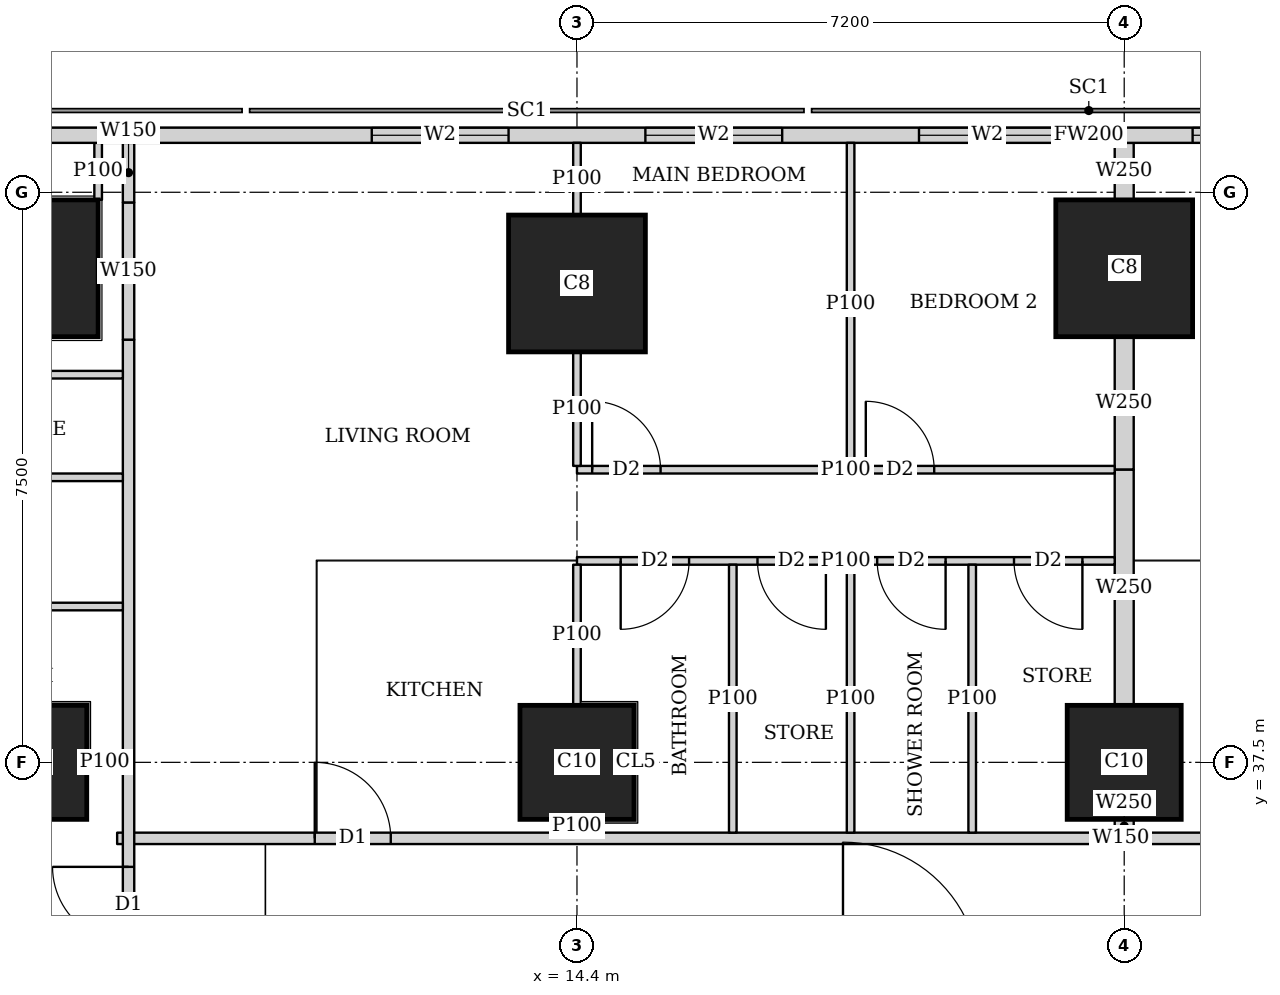
"""IFC4 building model, lengths in metres.
Left out: names, types, materials, properties, quantities, classifications, styles, units other than length and angle.
Written with IfcOpenShell. Run it as: python <this file> out.ifc"""

import sys

from ifc_helpers import new_model, si_unit, direction, frame, frame_2d, origin, origin_2d, place, context, subcontext, project, spatial, rectangle, extrude, element, fill, save


model = new_model("IFC4")
c1 = context("Model", 3, precision=1e-05, world=origin(), true_north=direction((0.0, 1.0)))
c2 = subcontext(c1, "Body", "Model", "MODEL_VIEW")
j1 = project(units=[si_unit("LENGTHUNIT", "METRE"), si_unit("PLANEANGLEUNIT", "RADIAN")], contexts=[c1])
p1 = place(None, origin())
s1 = spatial("IfcSite", under=j1, at=p1, CompositionType="ELEMENT")
p2 = place(p1, origin())
s2 = spatial("IfcBuilding", under=s1, at=p2, CompositionType="ELEMENT")
p3 = place(p2, frame((0.0, 0.0, 180.8)))
s3 = spatial("IfcBuildingStorey", under=s2, at=p3, CompositionType="ELEMENT", Elevation=180.8)
for number, where, z_axis, x_axis in (
    (1, (7.2, 37.5, 0.0), (0.0, 0.0, 1.0), (1.0, 0.0, 0.0)),
    (2, (14.4, 37.5, 0.0), (0.0, 0.0, 1.0), (1.0, 0.0, 0.0)),
    (3, (21.6, 37.5, 0.0), (0.0, 0.0, 1.0), (1.0, 0.0, 0.0)),
):
    element("IfcColumn", number, at=place(p3, frame(where, z_axis=z_axis, x_axis=x_axis)), inside=s3, PredefinedType="COLUMN", context=c2, shape_type="SweptSolid", body=[
        extrude(rectangle(XDim=1.5, YDim=1.5, at=origin_2d()), origin(), (0.0, 0.0, 1.0), 3.75),
    ])
for number, where, z_axis, x_axis in (
    (4, (7.2, 44.0, 0.0), (0.0, 0.0, 1.0), (1.0, 0.0, 0.0)),
    (5, (14.4, 43.8, 0.0), (0.0, 0.0, 1.0), (1.0, 0.0, 0.0)),
    (6, (21.6, 44.0, 0.0), (0.0, 0.0, 1.0), (1.0, 0.0, 0.0)),
):
    element("IfcColumn", number, at=place(p3, frame(where, z_axis=z_axis, x_axis=x_axis)), inside=s3, PredefinedType="COLUMN", context=c2, shape_type="SweptSolid", body=[
        extrude(rectangle(XDim=1.8, YDim=1.8, at=origin_2d()), origin(), (0.0, 0.0, 1.0), 3.75),
    ])
p4 = place(p3, frame((40.106, 45.75, 0.0), z_axis=(0.0, 0.0, 1.0), x_axis=(-1.0, 0.0, 0.0)))
e7 = element("IfcWall", 7, at=p4, inside=s3, PredefinedType="SOLIDWALL", context=c2, shape_type="SweptSolid", body=[
    extrude(rectangle(XDim=37.943, YDim=0.2, at=frame_2d((18.971, 0.0))), origin(), (0.0, 0.0, 1.0), 3.5),
])
p5 = place(p4, frame((8.606, 0.0, 0.9)))
e8 = element("IfcOpeningElement", 8, at=p5, cuts=e7, PredefinedType="OPENING", context=c2, shape_type="SweptSolid", body=[
    extrude(rectangle(XDim=1.8, YDim=1.5, at=frame_2d((0.9, 0.75))), frame((0.0, 0.11, 0.0), z_axis=(0.0, -1.0, 0.0), x_axis=(1.0, 0.0, 0.0)), (0.0, 0.0, 1.0), 0.22),
])
p6 = place(p4, frame((12.206, 0.0, 0.9)))
e9 = element("IfcOpeningElement", 9, at=p6, cuts=e7, PredefinedType="OPENING", context=c2, shape_type="SweptSolid", body=[
    extrude(rectangle(XDim=1.8, YDim=1.5, at=frame_2d((0.9, 0.75))), frame((0.0, 0.11, 0.0), z_axis=(0.0, -1.0, 0.0), x_axis=(1.0, 0.0, 0.0)), (0.0, 0.0, 1.0), 0.22),
])
p7 = place(p4, frame((15.806, 0.0, 0.9)))
e10 = element("IfcOpeningElement", 10, at=p7, cuts=e7, PredefinedType="OPENING", context=c2, shape_type="SweptSolid", body=[
    extrude(rectangle(XDim=1.8, YDim=1.5, at=frame_2d((0.9, 0.75))), frame((0.0, 0.11, 0.0), z_axis=(0.0, -1.0, 0.0), x_axis=(1.0, 0.0, 0.0)), (0.0, 0.0, 1.0), 0.22),
])
p8 = place(p4, frame((19.406, 0.0, 0.9)))
e11 = element("IfcOpeningElement", 11, at=p8, cuts=e7, PredefinedType="OPENING", context=c2, shape_type="SweptSolid", body=[
    extrude(rectangle(XDim=1.8, YDim=1.5, at=frame_2d((0.9, 0.75))), frame((0.0, 0.11, 0.0), z_axis=(0.0, -1.0, 0.0), x_axis=(1.0, 0.0, 0.0)), (0.0, 0.0, 1.0), 0.22),
])
p9 = place(p4, frame((23.006, 0.0, 0.9)))
e12 = element("IfcOpeningElement", 12, at=p9, cuts=e7, PredefinedType="OPENING", context=c2, shape_type="SweptSolid", body=[
    extrude(rectangle(XDim=1.8, YDim=1.5, at=frame_2d((0.9, 0.75))), frame((0.0, 0.11, 0.0), z_axis=(0.0, -1.0, 0.0), x_axis=(1.0, 0.0, 0.0)), (0.0, 0.0, 1.0), 0.22),
])
p10 = place(p4, frame((26.606, 0.0, 0.9)))
e13 = element("IfcOpeningElement", 13, at=p10, cuts=e7, PredefinedType="OPENING", context=c2, shape_type="SweptSolid", body=[
    extrude(rectangle(XDim=1.8, YDim=1.5, at=frame_2d((0.9, 0.75))), frame((0.0, 0.11, 0.0), z_axis=(0.0, -1.0, 0.0), x_axis=(1.0, 0.0, 0.0)), (0.0, 0.0, 1.0), 0.22),
])
p11 = place(p3, frame((8.5, 1.964, 0.0), z_axis=(0.0, 0.0, 1.0), x_axis=(0.0, 1.0, 0.0)))
e14 = element("IfcWall", 14, at=p11, inside=s3, PredefinedType="SOLIDWALL", context=c2, shape_type="SweptSolid", body=[
    extrude(rectangle(XDim=41.097, YDim=0.15, at=frame_2d((20.548, 0.0))), origin(), (0.0, 0.0, 1.0), 3.5),
])
p12 = place(p11, frame((10.661, 0.0, 0.0)))
e15 = element("IfcOpeningElement", 15, at=p12, cuts=e14, PredefinedType="OPENING", context=c2, shape_type="SweptSolid", body=[
    extrude(rectangle(XDim=1.0, YDim=2.1, at=frame_2d((0.5, 1.05))), frame((0.0, 0.085, 0.0), z_axis=(0.0, -1.0, 0.0), x_axis=(1.0, 0.0, 0.0)), (0.0, 0.0, 1.0), 0.17),
])
p13 = place(p11, frame((14.411, 0.0, 0.0)))
e16 = element("IfcOpeningElement", 16, at=p13, cuts=e14, PredefinedType="OPENING", context=c2, shape_type="SweptSolid", body=[
    extrude(rectangle(XDim=1.0, YDim=2.1, at=frame_2d((0.5, 1.05))), frame((0.0, 0.085, 0.0), z_axis=(0.0, -1.0, 0.0), x_axis=(1.0, 0.0, 0.0)), (0.0, 0.0, 1.0), 0.17),
])
p14 = place(p11, frame((21.911, 0.0, 0.0)))
e17 = element("IfcOpeningElement", 17, at=p14, cuts=e14, PredefinedType="OPENING", context=c2, shape_type="SweptSolid", body=[
    extrude(rectangle(XDim=1.0, YDim=2.1, at=frame_2d((0.5, 1.05))), frame((0.0, 0.085, 0.0), z_axis=(0.0, -1.0, 0.0), x_axis=(1.0, 0.0, 0.0)), (0.0, 0.0, 1.0), 0.17),
])
p15 = place(p11, frame((33.161, 0.0, 0.0)))
e18 = element("IfcOpeningElement", 18, at=p15, cuts=e14, PredefinedType="OPENING", context=c2, shape_type="SweptSolid", body=[
    extrude(rectangle(XDim=1.0, YDim=2.1, at=frame_2d((0.5, 1.05))), frame((0.0, 0.085, 0.0), z_axis=(0.0, -1.0, 0.0), x_axis=(1.0, 0.0, 0.0)), (0.0, 0.0, 1.0), 0.17),
])
p16 = place(p3, frame((8.5, 43.061, 0.0), z_axis=(0.0, 0.0, 1.0), x_axis=(0.0, 1.0, 0.0)))
e19 = element("IfcWall", 19, at=p16, inside=s3, PredefinedType="SOLIDWALL", context=c2, shape_type="SweptSolid", body=[
    extrude(rectangle(XDim=1.805, YDim=0.15, at=frame_2d((0.902, 0.0))), origin(), (0.0, 0.0, 1.0), 2.1),
])
p17 = place(p3, frame((8.5, 44.866, 0.0), z_axis=(0.0, 0.0, 1.0), x_axis=(0.0, 1.0, 0.0)))
e20 = element("IfcWall", 20, at=p17, inside=s3, PredefinedType="SOLIDWALL", context=c2, shape_type="SweptSolid", body=[
    extrude(rectangle(XDim=0.784, YDim=0.15, at=frame_2d((0.392, 0.0))), origin(), (0.0, 0.0, 1.0), 3.5),
])
p18 = place(p3, frame((8.35, 36.5, 0.0), z_axis=(0.0, 0.0, 1.0), x_axis=(1.0, 0.0, 0.0)))
e21 = element("IfcWall", 21, at=p18, inside=s3, PredefinedType="SOLIDWALL", context=c2, shape_type="SweptSolid", body=[
    extrude(rectangle(XDim=26.415, YDim=0.15, at=frame_2d((13.208, 0.0))), origin(), (0.0, 0.0, 1.0), 3.5),
])
p19 = place(p18, frame((2.6, 0.0, 0.0)))
e22 = element("IfcOpeningElement", 22, at=p19, cuts=e21, PredefinedType="OPENING", context=c2, shape_type="SweptSolid", body=[
    extrude(rectangle(XDim=1.0, YDim=2.1, at=frame_2d((0.5, 1.05))), frame((0.0, 0.085, 0.0), z_axis=(0.0, -1.0, 0.0), x_axis=(1.0, 0.0, 0.0)), (0.0, 0.0, 1.0), 0.17),
])
p20 = place(p18, frame((14.75, 0.0, 0.0)))
e23 = element("IfcOpeningElement", 23, at=p20, cuts=e21, PredefinedType="OPENING", context=c2, shape_type="SweptSolid", body=[
    extrude(rectangle(XDim=1.0, YDim=2.1, at=frame_2d((0.5, 1.05))), frame((0.0, 0.085, 0.0), z_axis=(0.0, -1.0, 0.0), x_axis=(1.0, 0.0, 0.0)), (0.0, 0.0, 1.0), 0.17),
])
p21 = place(p18, frame((23.923, 0.0, 0.0)))
e24 = element("IfcOpeningElement", 24, at=p21, cuts=e21, PredefinedType="OPENING", context=c2, shape_type="SweptSolid", body=[
    extrude(rectangle(XDim=1.0, YDim=2.1, at=frame_2d((0.5, 1.05))), frame((0.0, 0.085, 0.0), z_axis=(0.0, -1.0, 0.0), x_axis=(1.0, 0.0, 0.0)), (0.0, 0.0, 1.0), 0.17),
])
p22 = place(p3, frame((8.1, 45.65, 0.0), z_axis=(0.0, 0.0, 1.0), x_axis=(0.0, -1.0, 0.0)))
e25 = element("IfcWall", 25, at=p22, inside=s3, PredefinedType="PARTITIONING", context=c2, shape_type="SweptSolid", body=[
    extrude(rectangle(XDim=0.749, YDim=0.1, at=frame_2d((0.375, 0.0))), origin(), (0.0, 0.0, 1.0), 3.5),
])
p23 = place(p3, frame((7.951, 37.5, 0.0), z_axis=(0.0, 0.0, 1.0), x_axis=(1.0, 0.0, 0.0)))
e26 = element("IfcWall", 26, at=p23, inside=s3, PredefinedType="PARTITIONING", context=c2, shape_type="SweptSolid", body=[
    extrude(rectangle(XDim=0.474, YDim=0.1, at=frame_2d((0.237, 0.0))), origin(), (0.0, 0.0, 1.0), 3.5),
])
for number, where, z_axis, x_axis in (
    (27, (4.9, 41.25, 0.0), (0.0, 0.0, 1.0), (1.0, 0.0, 0.0)),
    (28, (4.9, 39.55, 0.0), (0.0, 0.0, 1.0), (1.0, 0.0, 0.0)),
):
    element("IfcWall", number, at=place(p3, frame(where, z_axis=z_axis, x_axis=x_axis)), inside=s3, PredefinedType="PARTITIONING", context=c2, shape_type="SweptSolid", body=[
        extrude(rectangle(XDim=3.525, YDim=0.1, at=frame_2d((1.763, 0.0))), origin(), (0.0, 0.0, 1.0), 3.5),
    ])
p24 = place(p3, frame((14.4, 41.35, 0.0), z_axis=(0.0, 0.0, 1.0), x_axis=(1.0, 0.0, 0.0)))
e29 = element("IfcWall", 29, at=p24, inside=s3, PredefinedType="PARTITIONING", context=c2, shape_type="SweptSolid", body=[
    extrude(rectangle(XDim=7.075, YDim=0.1, at=frame_2d((3.538, 0.0))), origin(), (0.0, 0.0, 1.0), 3.5),
])
p25 = place(p24, frame((0.2, 0.0, 0.0)))
e30 = element("IfcOpeningElement", 30, at=p25, cuts=e29, PredefinedType="OPENING", context=c2, shape_type="SweptSolid", body=[
    extrude(rectangle(XDim=0.9, YDim=2.1, at=frame_2d((0.45, 1.05))), frame((0.0, 0.06, 0.0), z_axis=(0.0, -1.0, 0.0), x_axis=(1.0, 0.0, 0.0)), (0.0, 0.0, 1.0), 0.12),
])
p26 = place(p24, frame((3.8, 0.0, 0.0)))
e31 = element("IfcOpeningElement", 31, at=p26, cuts=e29, PredefinedType="OPENING", context=c2, shape_type="SweptSolid", body=[
    extrude(rectangle(XDim=0.9, YDim=2.1, at=frame_2d((0.45, 1.05))), frame((0.0, 0.06, 0.0), z_axis=(0.0, -1.0, 0.0), x_axis=(1.0, 0.0, 0.0)), (0.0, 0.0, 1.0), 0.12),
])
p27 = place(p3, frame((14.4, 40.15, 0.0), z_axis=(0.0, 0.0, 1.0), x_axis=(1.0, 0.0, 0.0)))
e32 = element("IfcWall", 32, at=p27, inside=s3, PredefinedType="PARTITIONING", context=c2, shape_type="SweptSolid", body=[
    extrude(rectangle(XDim=7.075, YDim=0.1, at=frame_2d((3.538, 0.0))), origin(), (0.0, 0.0, 1.0), 3.5),
])
p28 = place(p27, frame((0.575, 0.0, 0.0)))
e33 = element("IfcOpeningElement", 33, at=p28, cuts=e32, PredefinedType="OPENING", context=c2, shape_type="SweptSolid", body=[
    extrude(rectangle(XDim=0.9, YDim=2.1, at=frame_2d((0.45, 1.05))), frame((0.0, 0.06, 0.0), z_axis=(0.0, -1.0, 0.0), x_axis=(1.0, 0.0, 0.0)), (0.0, 0.0, 1.0), 0.12),
])
p29 = place(p27, frame((3.95, 0.0, 0.0)))
e34 = element("IfcOpeningElement", 34, at=p29, cuts=e32, PredefinedType="OPENING", context=c2, shape_type="SweptSolid", body=[
    extrude(rectangle(XDim=0.9, YDim=2.1, at=frame_2d((0.45, 1.05))), frame((0.0, 0.06, 0.0), z_axis=(0.0, -1.0, 0.0), x_axis=(1.0, 0.0, 0.0)), (0.0, 0.0, 1.0), 0.12),
])
p30 = place(p27, frame((2.375, 0.0, 0.0)))
e35 = element("IfcOpeningElement", 35, at=p30, cuts=e32, PredefinedType="OPENING", context=c2, shape_type="SweptSolid", body=[
    extrude(rectangle(XDim=0.9, YDim=2.1, at=frame_2d((0.45, 1.05))), frame((0.0, 0.06, 0.0), z_axis=(0.0, -1.0, 0.0), x_axis=(1.0, 0.0, 0.0)), (0.0, 0.0, 1.0), 0.12),
])
p31 = place(p27, frame((5.75, 0.0, 0.0)))
e36 = element("IfcOpeningElement", 36, at=p31, cuts=e32, PredefinedType="OPENING", context=c2, shape_type="SweptSolid", body=[
    extrude(rectangle(XDim=0.9, YDim=2.1, at=frame_2d((0.45, 1.05))), frame((0.0, 0.06, 0.0), z_axis=(0.0, -1.0, 0.0), x_axis=(1.0, 0.0, 0.0)), (0.0, 0.0, 1.0), 0.12),
])
p32 = place(p3, frame((14.4, 41.4, 0.0), z_axis=(0.0, 0.0, 1.0), x_axis=(0.0, 1.0, 0.0)))
e37 = element("IfcWall", 37, at=p32, inside=s3, PredefinedType="PARTITIONING", context=c2, shape_type="SweptSolid", body=[
    extrude(rectangle(XDim=1.499, YDim=0.1, at=frame_2d((0.75, 0.0))), origin(), (0.0, 0.0, 1.0), 3.5),
])
p33 = place(p3, frame((14.4, 44.701, 0.0), z_axis=(0.0, 0.0, 1.0), x_axis=(0.0, 1.0, 0.0)))
e38 = element("IfcWall", 38, at=p33, inside=s3, PredefinedType="PARTITIONING", context=c2, shape_type="SweptSolid", body=[
    extrude(rectangle(XDim=0.949, YDim=0.1, at=frame_2d((0.475, 0.0))), origin(), (0.0, 0.0, 1.0), 3.5),
])
p34 = place(p3, frame((18.0, 41.4, 0.0), z_axis=(0.0, 0.0, 1.0), x_axis=(0.0, 1.0, 0.0)))
e39 = element("IfcWall", 39, at=p34, inside=s3, PredefinedType="PARTITIONING", context=c2, shape_type="SweptSolid", body=[
    extrude(rectangle(XDim=4.25, YDim=0.1, at=frame_2d((2.125, 0.0))), origin(), (0.0, 0.0, 1.0), 2.1),
])
p35 = place(p3, frame((14.4, 36.575, 0.0), z_axis=(0.0, 0.0, 1.0), x_axis=(0.0, 1.0, 0.0)))
e40 = element("IfcWall", 40, at=p35, inside=s3, PredefinedType="PARTITIONING", context=c2, shape_type="SweptSolid", body=[
    extrude(rectangle(XDim=0.174, YDim=0.1, at=frame_2d((0.087, 0.0))), origin(), (0.0, 0.0, 1.0), 3.5),
])
p36 = place(p3, frame((14.4, 38.251, 0.0), z_axis=(0.0, 0.0, 1.0), x_axis=(0.0, 1.0, 0.0)))
e41 = element("IfcWall", 41, at=p36, inside=s3, PredefinedType="PARTITIONING", context=c2, shape_type="SweptSolid", body=[
    extrude(rectangle(XDim=1.849, YDim=0.1, at=frame_2d((0.925, 0.0))), origin(), (0.0, 0.0, 1.0), 3.5),
])
for number, where, z_axis, x_axis in (
    (42, (18.0, 36.575, 0.0), (0.0, 0.0, 1.0), (0.0, 1.0, 0.0)),
    (43, (16.45, 36.575, 0.0), (0.0, 0.0, 1.0), (0.0, 1.0, 0.0)),
    (44, (19.6, 36.575, 0.0), (0.0, 0.0, 1.0), (0.0, 1.0, 0.0)),
):
    element("IfcWall", number, at=place(p3, frame(where, z_axis=z_axis, x_axis=x_axis)), inside=s3, PredefinedType="PARTITIONING", context=c2, shape_type="SweptSolid", body=[
        extrude(rectangle(XDim=3.525, YDim=0.1, at=frame_2d((1.763, 0.0))), origin(), (0.0, 0.0, 1.0), 3.5),
    ])
p37 = place(p3, frame((21.6, 41.35, 0.0), z_axis=(0.0, 0.0, 1.0), x_axis=(0.0, 1.0, 0.0)))
e45 = element("IfcWall", 45, at=p37, inside=s3, PredefinedType="SOLIDWALL", context=c2, shape_type="SweptSolid", body=[
    extrude(rectangle(XDim=1.749, YDim=0.25, at=frame_2d((0.875, 0.0))), origin(), (0.0, 0.0, 1.0), 2.1),
])
p38 = place(p3, frame((21.6, 44.901, 0.0), z_axis=(0.0, 0.0, 1.0), x_axis=(0.0, 1.0, 0.0)))
e46 = element("IfcWall", 46, at=p38, inside=s3, PredefinedType="SOLIDWALL", context=c2, shape_type="SweptSolid", body=[
    extrude(rectangle(XDim=0.749, YDim=0.25, at=frame_2d((0.375, 0.0))), origin(), (0.0, 0.0, 1.0), 2.1),
])
p39 = place(p3, frame((21.6, 36.575, 0.0), z_axis=(0.0, 0.0, 1.0), x_axis=(0.0, 1.0, 0.0)))
e47 = element("IfcWall", 47, at=p39, inside=s3, PredefinedType="SOLIDWALL", context=c2, shape_type="SweptSolid", body=[
    extrude(rectangle(XDim=0.174, YDim=0.25, at=frame_2d((0.087, 0.0))), origin(), (0.0, 0.0, 1.0), 3.5),
])
p40 = place(p3, frame((21.6, 38.251, 0.0), z_axis=(0.0, 0.0, 1.0), x_axis=(0.0, 1.0, 0.0)))
e48 = element("IfcWall", 48, at=p40, inside=s3, PredefinedType="SOLIDWALL", context=c2, shape_type="SweptSolid", body=[
    extrude(rectangle(XDim=3.099, YDim=0.25, at=frame_2d((1.55, 0.0))), origin(), (0.0, 0.0, 1.0), 3.5),
])
p41 = place(p3, frame((8.425, 42.6, 0.0), z_axis=(0.0, 0.0, 1.0), x_axis=(-1.0, 0.0, 0.0)))
e49 = element("IfcWall", 49, at=p41, inside=s3, PredefinedType="PARTITIONING", context=c2, shape_type="SweptSolid", body=[
    extrude(rectangle(XDim=3.022, YDim=0.1, at=frame_2d((1.511, 0.0))), origin(), (0.0, 0.0, 1.0), 3.5),
])
p42 = place(p41, frame((1.95, 0.0, 0.0)))
e50 = element("IfcOpeningElement", 50, at=p42, cuts=e49, PredefinedType="OPENING", context=c2, shape_type="SweptSolid", body=[
    extrude(rectangle(XDim=0.9, YDim=2.1, at=frame_2d((0.45, 1.05))), frame((0.0, 0.06, 0.0), z_axis=(0.0, -1.0, 0.0), x_axis=(1.0, 0.0, 0.0)), (0.0, 0.0, 1.0), 0.12),
])
p43 = place(p7, origin())
e51 = element("IfcWindow", 51, at=p43, inside=s3, PartitioningType="SINGLE_PANEL", PredefinedType="WINDOW", context=c2, shape_type="SweptSolid", body=[
    extrude(rectangle(XDim=1.8, YDim=1.5, at=frame_2d((0.9, 0.75))), frame((0.0, 0.03, 0.0), z_axis=(0.0, -1.0, 0.0), x_axis=(1.0, 0.0, 0.0)), (0.0, 0.0, 1.0), 0.06),
])
fill(e10, e51)
p44 = place(p8, origin())
e52 = element("IfcWindow", 52, at=p44, inside=s3, PartitioningType="SINGLE_PANEL", PredefinedType="WINDOW", context=c2, shape_type="SweptSolid", body=[
    extrude(rectangle(XDim=1.8, YDim=1.5, at=frame_2d((0.9, 0.75))), frame((0.0, 0.03, 0.0), z_axis=(0.0, -1.0, 0.0), x_axis=(1.0, 0.0, 0.0)), (0.0, 0.0, 1.0), 0.06),
])
fill(e11, e52)
p45 = place(p9, origin())
e53 = element("IfcWindow", 53, at=p45, inside=s3, PartitioningType="SINGLE_PANEL", PredefinedType="WINDOW", context=c2, shape_type="SweptSolid", body=[
    extrude(rectangle(XDim=1.8, YDim=1.5, at=frame_2d((0.9, 0.75))), frame((0.0, 0.03, 0.0), z_axis=(0.0, -1.0, 0.0), x_axis=(1.0, 0.0, 0.0)), (0.0, 0.0, 1.0), 0.06),
])
fill(e12, e53)
p46 = place(p10, origin())
e54 = element("IfcWindow", 54, at=p46, inside=s3, PartitioningType="SINGLE_PANEL", PredefinedType="WINDOW", context=c2, shape_type="SweptSolid", body=[
    extrude(rectangle(XDim=1.8, YDim=1.5, at=frame_2d((0.9, 0.75))), frame((0.0, 0.03, 0.0), z_axis=(0.0, -1.0, 0.0), x_axis=(1.0, 0.0, 0.0)), (0.0, 0.0, 1.0), 0.06),
])
fill(e13, e54)
p47 = place(p15, origin())
e55 = element("IfcDoor", 55, at=p47, inside=s3, OperationType="SINGLE_SWING_RIGHT", PredefinedType="DOOR", context=c2, shape_type="SweptSolid", body=[
    extrude(rectangle(XDim=1.0, YDim=2.1, at=frame_2d((0.5, 1.05))), frame((0.0, 0.025, 0.0), z_axis=(0.0, -1.0, 0.0), x_axis=(1.0, 0.0, 0.0)), (0.0, 0.0, 1.0), 0.05),
])
fill(e18, e55)
p48 = place(p25, origin())
e56 = element("IfcDoor", 56, at=p48, inside=s3, OperationType="SINGLE_SWING_LEFT", PredefinedType="DOOR", context=c2, shape_type="SweptSolid", body=[
    extrude(rectangle(XDim=0.9, YDim=2.1, at=frame_2d((0.45, 1.05))), frame((0.0, 0.025, 0.0), z_axis=(0.0, -1.0, 0.0), x_axis=(1.0, 0.0, 0.0)), (0.0, 0.0, 1.0), 0.05),
])
fill(e30, e56)
p49 = place(p26, origin())
e57 = element("IfcDoor", 57, at=p49, inside=s3, OperationType="SINGLE_SWING_LEFT", PredefinedType="DOOR", context=c2, shape_type="SweptSolid", body=[
    extrude(rectangle(XDim=0.9, YDim=2.1, at=frame_2d((0.45, 1.05))), frame((0.0, 0.025, 0.0), z_axis=(0.0, -1.0, 0.0), x_axis=(1.0, 0.0, 0.0)), (0.0, 0.0, 1.0), 0.05),
])
fill(e31, e57)
p50 = place(p28, origin())
e58 = element("IfcDoor", 58, at=p50, inside=s3, OperationType="SINGLE_SWING_RIGHT", PredefinedType="DOOR", context=c2, shape_type="SweptSolid", body=[
    extrude(rectangle(XDim=0.9, YDim=2.1, at=frame_2d((0.45, 1.05))), frame((0.0, 0.025, 0.0), z_axis=(0.0, -1.0, 0.0), x_axis=(1.0, 0.0, 0.0)), (0.0, 0.0, 1.0), 0.05),
])
fill(e33, e58)
p51 = place(p29, origin())
e59 = element("IfcDoor", 59, at=p51, inside=s3, OperationType="SINGLE_SWING_LEFT", PredefinedType="DOOR", context=c2, shape_type="SweptSolid", body=[
    extrude(rectangle(XDim=0.9, YDim=2.1, at=frame_2d((0.45, 1.05))), frame((0.0, 0.025, 0.0), z_axis=(0.0, -1.0, 0.0), x_axis=(1.0, 0.0, 0.0)), (0.0, 0.0, 1.0), 0.05),
])
fill(e34, e59)
p52 = place(p30, origin())
e60 = element("IfcDoor", 60, at=p52, inside=s3, OperationType="SINGLE_SWING_LEFT", PredefinedType="DOOR", context=c2, shape_type="SweptSolid", body=[
    extrude(rectangle(XDim=0.9, YDim=2.1, at=frame_2d((0.45, 1.05))), frame((0.0, 0.025, 0.0), z_axis=(0.0, -1.0, 0.0), x_axis=(1.0, 0.0, 0.0)), (0.0, 0.0, 1.0), 0.05),
])
fill(e35, e60)
p53 = place(p31, origin())
e61 = element("IfcDoor", 61, at=p53, inside=s3, OperationType="SINGLE_SWING_LEFT", PredefinedType="DOOR", context=c2, shape_type="SweptSolid", body=[
    extrude(rectangle(XDim=0.9, YDim=2.1, at=frame_2d((0.45, 1.05))), frame((0.0, 0.025, 0.0), z_axis=(0.0, -1.0, 0.0), x_axis=(1.0, 0.0, 0.0)), (0.0, 0.0, 1.0), 0.05),
])
fill(e36, e61)
p54 = place(p19, origin())
e62 = element("IfcDoor", 62, at=p54, inside=s3, OperationType="SINGLE_SWING_LEFT", PredefinedType="DOOR", context=c2, shape_type="SweptSolid", body=[
    extrude(rectangle(XDim=1.0, YDim=2.1, at=frame_2d((0.5, 1.05))), frame((0.0, 0.025, 0.0), z_axis=(0.0, -1.0, 0.0), x_axis=(1.0, 0.0, 0.0)), (0.0, 0.0, 1.0), 0.05),
])
fill(e22, e62)
save(model, sys.argv[1])
